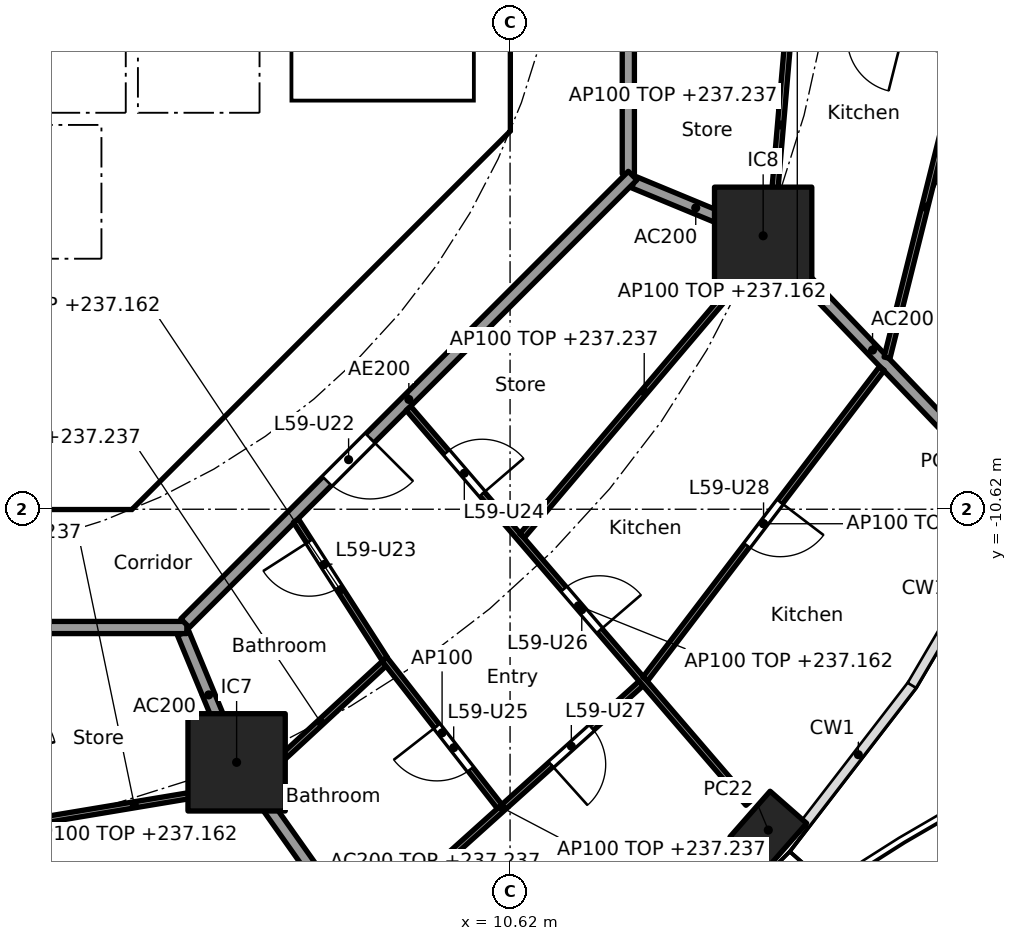
"""IFC4 building model, lengths in metres.
Left out: names, types, materials, properties, quantities, classifications, styles, units other than length and angle.
Written with IfcOpenShell. Run it as: python <this file> out.ifc"""

import sys

from ifc_helpers import new_model, si_unit, direction, frame, frame_2d, origin, origin_2d, place, context, subcontext, project, spatial, polyline, rectangle, hollow_rectangle, outline, extrude, element, fill, save


model = new_model("IFC4")
c1 = context("Model", 3, precision=1e-05, world=origin(), true_north=direction((0.0, 1.0)))
c2 = subcontext(c1, "Body", "Model", "MODEL_VIEW")
j1 = project(units=[si_unit("LENGTHUNIT", "METRE"), si_unit("PLANEANGLEUNIT", "RADIAN")], contexts=[c1])
p1 = place(None, origin())
s1 = spatial("IfcSite", under=j1, at=p1, CompositionType="ELEMENT")
p2 = place(p1, origin())
s2 = spatial("IfcBuilding", under=s1, at=p2, CompositionType="ELEMENT")
p3 = place(p2, frame((0.0, 0.0, 234.4)))
s3 = spatial("IfcBuildingStorey", under=s2, at=p3, CompositionType="ELEMENT", Elevation=234.4)
p4 = place(p3, frame((14.866, -15.896, 0.0), z_axis=(0.0, 0.0, 1.0), x_axis=(0.660114607735, 0.751164898445, 0.0)))
e1 = element("IfcColumn", 1, at=p4, inside=s3, PredefinedType="COLUMN", context=c2, shape_type="SweptSolid", body=[
    extrude(hollow_rectangle(XDim=1.0, YDim=0.8, WallThickness=0.032, at=origin_2d()), origin(), (0.0, 0.0, 1.0), 3.7),
])
for number, where, z_axis, x_axis in (
    (2, (6.123, -14.782, 0.0), (0.0, 0.0, 1.0), (1.0, 0.0, 0.0)),
    (3, (14.782, -6.123, 0.0), (0.0, 0.0, 1.0), (1.0, 0.0, 0.0)),
):
    element("IfcColumn", number, at=place(p3, frame(where, z_axis=z_axis, x_axis=x_axis)), inside=s3, PredefinedType="COLUMN", context=c2, shape_type="SweptSolid", body=[
        extrude(rectangle(XDim=1.6, YDim=1.6, at=origin_2d()), origin(), (0.0, 0.0, 1.0), 3.7),
    ])
p5 = place(p3, frame((4.613, -9.988, 0.0), z_axis=(0.0, 0.0, 1.0), x_axis=(0.707106781187, 0.707106781187, 0.0)))
e4 = element("IfcWall", 4, at=p5, inside=s3, PredefinedType="SHEAR", context=c2, shape_type="SweptSolid", body=[
    extrude(rectangle(XDim=7.602, YDim=0.6, at=frame_2d((3.801, 0.0))), origin(), (0.0, 0.0, 1.0), 3.44),
])
p6 = place(p5, frame((3.201, 0.0, 0.0)))
e5 = element("IfcOpeningElement", 5, at=p6, cuts=e4, PredefinedType="OPENING", context=c2, shape_type="SweptSolid", body=[
    extrude(rectangle(XDim=1.2, YDim=2.1, at=frame_2d((0.6, 1.05))), frame((0.0, 0.31, 0.0), z_axis=(0.0, -1.0, 0.0), x_axis=(1.0, 0.0, 0.0)), (0.0, 0.0, 1.0), 0.62),
])
p7 = place(p3, frame((4.0, -10.025, 0.0), z_axis=(0.0, 0.0, 1.0), x_axis=(0.0, 1.0, 0.0)))
e6 = element("IfcWall", 6, at=p7, inside=s3, PredefinedType="SOLIDWALL", context=c2, shape_type="SweptSolid", body=[
    extrude(rectangle(XDim=3.0, YDim=0.2, at=frame_2d((1.5, 0.0))), origin(), (0.0, 0.0, 1.0), 3.44),
])
p8 = place(p7, frame((0.975, 0.0, 0.0)))
e7 = element("IfcOpeningElement", 7, at=p8, cuts=e6, PredefinedType="OPENING", context=c2, shape_type="SweptSolid", body=[
    extrude(rectangle(XDim=1.1, YDim=2.1, at=frame_2d((0.55, 1.05))), frame((0.0, 0.11, 0.0), z_axis=(0.0, -1.0, 0.0), x_axis=(1.0, 0.0, 0.0)), (0.0, 0.0, 1.0), 0.22),
])
p9 = place(p3, frame((4.0, -6.5, 0.0), z_axis=(0.0, 0.0, 1.0), x_axis=(0.0, 1.0, 0.0)))
e8 = element("IfcWall", 8, at=p9, inside=s3, PredefinedType="SOLIDWALL", context=c2, shape_type="SweptSolid", body=[
    extrude(rectangle(XDim=2.2, YDim=0.2, at=frame_2d((1.1, 0.0))), origin(), (0.0, 0.0, 1.0), 3.44),
])
p10 = place(p9, frame((0.55, 0.0, 0.0)))
e9 = element("IfcOpeningElement", 9, at=p10, cuts=e8, PredefinedType="OPENING", context=c2, shape_type="SweptSolid", body=[
    extrude(rectangle(XDim=1.1, YDim=2.1, at=frame_2d((0.55, 1.05))), frame((0.0, 0.11, 0.0), z_axis=(0.0, -1.0, 0.0), x_axis=(1.0, 0.0, 0.0)), (0.0, 0.0, 1.0), 0.22),
])
p11 = place(p3, origin())
e10 = element("IfcWall", 10, at=p11, inside=s3, PredefinedType="SHEAR", context=c2, shape_type="SweptSolid", body=[
    extrude(outline(polyline([(-4.152, -10.025), (4.152, -10.025), (4.401, -9.776), (4.825, -10.2), (4.401, -10.625), (-4.401, -10.625), (-4.825, -10.2), (-4.401, -9.776), (-4.152, -10.025)])), origin(), (0.0, 0.0, 1.0), 3.44),
])
p12 = place(p3, origin())
e11 = element("IfcWall", 11, at=p12, inside=s3, PredefinedType="SHEAR", context=c2, shape_type="SweptSolid", body=[
    extrude(outline(polyline([(9.776, -4.401), (10.025, -4.152), (10.025, -3.801), (10.025, 4.152), (9.776, 4.401), (10.2, 4.825), (10.625, 4.401), (10.625, -4.401), (10.2, -4.825), (9.776, -4.401)])), origin(), (0.0, 0.0, 1.0), 3.44),
])
p13 = place(p3, origin())
e12 = element("IfcWall", 12, at=p13, inside=s3, PredefinedType="SOLIDWALL", context=c2, shape_type="SweptSolid", body=[
    extrude(outline(polyline([(-6.7, -2.1), (-6.5, -2.1), (-6.5, -4.1), (-4.5, -4.1), (-4.5, -2.1), (-4.3, -2.1), (-4.3, -4.1), (-2.3, -4.1), (-2.3, -2.1), (-2.1, -2.1), (-2.1, -4.1), (-0.1, -4.1), (-0.1, -2.1), (0.1, -2.1), (0.1, -4.1), (2.1, -4.1), (2.1, -2.1), (2.3, -2.1), (2.3, -4.1), (4.3, -4.1), (4.3, -2.1), (4.5, -2.1), (4.5, -4.1), (6.5, -4.1), (6.5, -2.1), (6.7, -2.1), (6.7, -4.3), (-6.7, -4.3), (-6.7, -2.1)])), origin(), (0.0, 0.0, 1.0), 3.44),
])
p14 = place(p3, origin())
e13 = element("IfcWall", 13, at=p14, inside=s3, PredefinedType="SOLIDWALL", context=c2, shape_type="SweptSolid", body=[
    extrude(outline(polyline([(4.1, -7.025), (-4.1, -7.025), (-4.1, -6.5), (4.1, -6.5), (4.1, -7.025)])), origin(), (0.0, 0.0, 1.0), 3.44),
])
p15 = place(p3, origin())
e14 = element("IfcWall", 14, at=p15, inside=s3, PredefinedType="SOLIDWALL", context=c2, shape_type="SweptSolid", body=[
    extrude(outline(polyline([(7.025, -3.9), (6.7, -3.9), (6.7, 3.9), (7.025, 3.9), (7.025, -3.9)])), origin(), (0.0, 0.0, 1.0), 3.44),
])
p16 = place(p3, origin())
e15 = element("IfcWall", 15, at=p16, inside=s3, PredefinedType="SOLIDWALL", context=c2, shape_type="SweptSolid", body=[
    extrude(outline(polyline([(10.025, -4.1), (6.7, -4.1), (6.7, -3.9), (10.025, -3.9), (10.025, -4.1)])), origin(), (0.0, 0.0, 1.0), 3.44),
])
p17 = place(p3, frame((5.243, -12.657, 0.0), z_axis=(0.0, 0.0, 1.0), x_axis=(0.382691608661, -0.923876145736, 0.0)))
e16 = element("IfcWall", 16, at=p17, inside=s3, PredefinedType="PARTITIONING", context=c2, shape_type="SweptSolid", body=[
    extrude(rectangle(XDim=2.2, YDim=0.2, at=frame_2d((1.1, 0.0))), origin(), (0.0, 0.0, 1.0), 3.44),
])
p18 = place(p3, frame((6.152, -14.823, 0.0), z_axis=(0.0, 0.0, 1.0), x_axis=(0.576994695158, -0.816747893637, 0.0)))
e17 = element("IfcWall", 17, at=p18, inside=s3, PredefinedType="PARTITIONING", context=c2, shape_type="SweptSolid", body=[
    extrude(rectangle(XDim=6.03, YDim=0.2, at=frame_2d((3.015, 0.0))), origin(), (0.0, 0.0, 1.0), 2.837),
])
p19 = place(p3, frame((12.657, -5.243, 0.0), z_axis=(0.0, 0.0, 1.0), x_axis=(0.923853160736, -0.382747093259, 0.0)))
e18 = element("IfcWall", 18, at=p19, inside=s3, PredefinedType="PARTITIONING", context=c2, shape_type="SweptSolid", body=[
    extrude(rectangle(XDim=2.2, YDim=0.2, at=frame_2d((1.1, 0.0))), origin(), (0.0, 0.0, 1.0), 3.44),
])
p20 = place(p3, frame((14.817, -6.159, 0.0), z_axis=(0.0, 0.0, 1.0), x_axis=(0.691437669875, -0.722436120828, 0.0)))
e19 = element("IfcWall", 19, at=p20, inside=s3, PredefinedType="PARTITIONING", context=c2, shape_type="SweptSolid", body=[
    extrude(rectangle(XDim=5.104, YDim=0.2, at=frame_2d((2.552, 0.0))), origin(), (0.0, 0.0, 1.0), 3.44),
])
p21 = place(p3, frame((12.565, -5.104, 0.0), z_axis=(0.0, 0.0, 1.0), x_axis=(0.0, 1.0, 0.0)))
e20 = element("IfcWall", 20, at=p21, inside=s3, PredefinedType="PARTITIONING", context=c2, shape_type="SweptSolid", body=[
    extrude(rectangle(XDim=10.209, YDim=0.2, at=frame_2d((5.104, 0.0))), origin(), (0.0, 0.0, 1.0), 3.44),
])
p22 = place(p21, frame((4.604, 0.0, 0.0)))
e21 = element("IfcOpeningElement", 21, at=p22, cuts=e20, PredefinedType="OPENING", context=c2, shape_type="SweptSolid", body=[
    extrude(rectangle(XDim=1.0, YDim=2.1, at=frame_2d((0.5, 1.05))), frame((0.0, 0.11, 0.0), z_axis=(0.0, -1.0, 0.0), x_axis=(1.0, 0.0, 0.0)), (0.0, 0.0, 1.0), 0.22),
])
p23 = place(p3, frame((-5.104, -12.565, 0.0), z_axis=(0.0, 0.0, 1.0), x_axis=(1.0, 0.0, 0.0)))
e22 = element("IfcWall", 22, at=p23, inside=s3, PredefinedType="PARTITIONING", context=c2, shape_type="SweptSolid", body=[
    extrude(rectangle(XDim=10.409, YDim=0.2, at=frame_2d((5.205, 0.0))), origin(), (0.0, 0.0, 1.0), 3.44),
])
p24 = place(p23, frame((4.604, 0.0, 0.0)))
e23 = element("IfcOpeningElement", 23, at=p24, cuts=e22, PredefinedType="OPENING", context=c2, shape_type="SweptSolid", body=[
    extrude(rectangle(XDim=1.0, YDim=2.1, at=frame_2d((0.5, 1.05))), frame((0.0, 0.11, 0.0), z_axis=(0.0, -1.0, 0.0), x_axis=(1.0, 0.0, 0.0)), (0.0, 0.0, 1.0), 0.22),
])
p25 = place(p3, frame((5.275, -12.494, 0.0), z_axis=(0.0, 0.0, 1.0), x_axis=(0.707106781187, 0.707106781187, 0.0)))
e24 = element("IfcWall", 24, at=p25, inside=s3, PredefinedType="PARTITIONING", context=c2, shape_type="SweptSolid", body=[
    extrude(rectangle(XDim=10.409, YDim=0.2, at=frame_2d((5.205, 0.0))), origin(), (0.0, 0.0, 1.0), 3.44),
])
p26 = place(p25, frame((3.303, 0.0, 0.0)))
e25 = element("IfcOpeningElement", 25, at=p26, cuts=e24, PredefinedType="OPENING", context=c2, shape_type="SweptSolid", body=[
    extrude(rectangle(XDim=1.0, YDim=2.1, at=frame_2d((0.5, 1.05))), frame((0.0, 0.11, 0.0), z_axis=(0.0, -1.0, 0.0), x_axis=(1.0, 0.0, 0.0)), (0.0, 0.0, 1.0), 0.22),
])
p27 = place(p3, frame((1.759, -12.662, 0.0), z_axis=(0.0, 0.0, 1.0), x_axis=(0.242653275363, -0.970113079984, 0.0)))
e26 = element("IfcWall", 26, at=p27, inside=s3, PredefinedType="PARTITIONING", context=c2, shape_type="SweptSolid", body=[
    extrude(rectangle(XDim=6.836, YDim=0.1, at=frame_2d((3.418, 0.0))), origin(), (0.0, 0.0, 1.0), 2.762),
])
p28 = place(p27, frame((1.166, 0.0, 0.0)))
e27 = element("IfcOpeningElement", 27, at=p28, cuts=e26, PredefinedType="OPENING", context=c2, shape_type="SweptSolid", body=[
    extrude(rectangle(XDim=0.9, YDim=2.1, at=frame_2d((0.45, 1.05))), frame((0.0, 0.06, 0.0), z_axis=(0.0, -1.0, 0.0), x_axis=(1.0, 0.0, 0.0)), (0.0, 0.0, 1.0), 0.12),
])
p29 = place(p27, frame((4.559, 0.0, 0.0)))
e28 = element("IfcOpeningElement", 28, at=p29, cuts=e26, PredefinedType="OPENING", context=c2, shape_type="SweptSolid", body=[
    extrude(rectangle(XDim=0.9, YDim=2.1, at=frame_2d((0.45, 1.05))), frame((0.0, 0.06, 0.0), z_axis=(0.0, -1.0, 0.0), x_axis=(1.0, 0.0, 0.0)), (0.0, 0.0, 1.0), 0.12),
])
p30 = place(p3, frame((2.593, -15.789, 0.0), z_axis=(0.0, 0.0, 1.0), x_axis=(0.986385117656, 0.164451815639, 0.0)))
e29 = element("IfcWall", 29, at=p30, inside=s3, PredefinedType="PARTITIONING", context=c2, shape_type="SweptSolid", body=[
    extrude(rectangle(XDim=3.747, YDim=0.1, at=frame_2d((1.874, 0.0))), origin(), (0.0, 0.0, 1.0), 2.837),
])
p31 = place(p3, frame((6.461, -15.088, 0.0), z_axis=(0.0, 0.0, 1.0), x_axis=(0.734625662691, 0.678472649203, 0.0)))
e30 = element("IfcWall", 30, at=p31, inside=s3, PredefinedType="PARTITIONING", context=c2, shape_type="SweptSolid", body=[
    extrude(rectangle(XDim=2.844, YDim=0.1, at=frame_2d((1.422, 0.0))), origin(), (0.0, 0.0, 1.0), 2.837),
])
p32 = place(p3, frame((8.22, -17.579, 0.0), z_axis=(0.0, 0.0, 1.0), x_axis=(0.743696370895, 0.668517544958, 0.0)))
e31 = element("IfcWall", 31, at=p32, inside=s3, PredefinedType="PARTITIONING", context=c2, shape_type="SweptSolid", body=[
    extrude(rectangle(XDim=6.125, YDim=0.1, at=frame_2d((3.062, 0.0))), origin(), (0.0, 0.0, 1.0), 2.837),
])
p33 = place(p32, frame((4.131, 0.0, 0.0)))
e32 = element("IfcOpeningElement", 32, at=p33, cuts=e31, PredefinedType="OPENING", context=c2, shape_type="SweptSolid", body=[
    extrude(rectangle(XDim=0.9, YDim=2.1, at=frame_2d((0.45, 1.05))), frame((0.0, 0.06, 0.0), z_axis=(0.0, -1.0, 0.0), x_axis=(1.0, 0.0, 0.0)), (0.0, 0.0, 1.0), 0.12),
])
p34 = place(p3, frame((7.099, -10.809, 0.0), z_axis=(0.0, 0.0, 1.0), x_axis=(0.540424285965, -0.841392649801, 0.0)))
e33 = element("IfcWall", 33, at=p34, inside=s3, PredefinedType="PARTITIONING", context=c2, shape_type="SweptSolid", body=[
    extrude(rectangle(XDim=2.703, YDim=0.1, at=frame_2d((1.352, 0.0))), origin(), (0.0, 0.0, 1.0), 2.762),
])
p35 = place(p34, frame((0.405, 0.0, 0.0)))
e34 = element("IfcOpeningElement", 34, at=p35, cuts=e33, PredefinedType="OPENING", context=c2, shape_type="SweptSolid", body=[
    extrude(rectangle(XDim=0.9, YDim=2.1, at=frame_2d((0.45, 1.05))), frame((0.0, 0.06, 0.0), z_axis=(0.0, -1.0, 0.0), x_axis=(1.0, 0.0, 0.0)), (0.0, 0.0, 1.0), 0.12),
])
p36 = place(p3, frame((8.555, -13.086, 0.0), z_axis=(0.0, 0.0, 1.0), x_axis=(0.61562093425, -0.788042426087, 0.0)))
e35 = element("IfcWall", 35, at=p36, inside=s3, PredefinedType="PARTITIONING", context=c2, shape_type="SweptSolid", body=[
    extrude(rectangle(XDim=3.075, YDim=0.1, at=frame_2d((1.538, 0.0))), origin(), (0.0, 0.0, 1.0), 3.44),
])
p37 = place(p36, frame((1.398, 0.0, 0.0)))
e36 = element("IfcOpeningElement", 36, at=p37, cuts=e35, PredefinedType="OPENING", context=c2, shape_type="SweptSolid", body=[
    extrude(rectangle(XDim=0.9, YDim=2.1, at=frame_2d((0.45, 1.05))), frame((0.0, 0.06, 0.0), z_axis=(0.0, -1.0, 0.0), x_axis=(1.0, 0.0, 0.0)), (0.0, 0.0, 1.0), 0.12),
])
p38 = place(p3, frame((8.95, -8.96, 0.0), z_axis=(0.0, 0.0, 1.0), x_axis=(0.652102165991, -0.758131100213, 0.0)))
e37 = element("IfcWall", 37, at=p38, inside=s3, PredefinedType="PARTITIONING", context=c2, shape_type="SweptSolid", body=[
    extrude(rectangle(XDim=8.568, YDim=0.1, at=frame_2d((4.284, 0.0))), origin(), (0.0, 0.0, 1.0), 2.762),
])
p39 = place(p38, frame((0.957, 0.0, 0.0)))
e38 = element("IfcOpeningElement", 38, at=p39, cuts=e37, PredefinedType="OPENING", context=c2, shape_type="SweptSolid", body=[
    extrude(rectangle(XDim=0.9, YDim=2.1, at=frame_2d((0.45, 1.05))), frame((0.0, 0.06, 0.0), z_axis=(0.0, -1.0, 0.0), x_axis=(1.0, 0.0, 0.0)), (0.0, 0.0, 1.0), 0.12),
])
p40 = place(p38, frame((3.919, 0.0, 0.0)))
e39 = element("IfcOpeningElement", 39, at=p40, cuts=e37, PredefinedType="OPENING", context=c2, shape_type="SweptSolid", body=[
    extrude(rectangle(XDim=0.9, YDim=2.1, at=frame_2d((0.45, 1.05))), frame((0.0, 0.06, 0.0), z_axis=(0.0, -1.0, 0.0), x_axis=(1.0, 0.0, 0.0)), (0.0, 0.0, 1.0), 0.12),
])
p41 = place(p3, frame((10.818, -11.056, 0.0), z_axis=(0.0, 0.0, 1.0), x_axis=(0.646981604878, 0.762505608471, 0.0)))
e40 = element("IfcWall", 40, at=p41, inside=s3, PredefinedType="PARTITIONING", context=c2, shape_type="SweptSolid", body=[
    extrude(rectangle(XDim=6.209, YDim=0.1, at=frame_2d((3.104, 0.0))), origin(), (0.0, 0.0, 1.0), 2.837),
])
p42 = place(p3, frame((12.843, -13.411, 0.0), z_axis=(0.0, 0.0, 1.0), x_axis=(0.606128002625, 0.795367112995, 0.0)))
e41 = element("IfcWall", 41, at=p42, inside=s3, PredefinedType="PARTITIONING", context=c2, shape_type="SweptSolid", body=[
    extrude(rectangle(XDim=6.42, YDim=0.1, at=frame_2d((3.21, 0.0))), origin(), (0.0, 0.0, 1.0), 2.837),
])
p43 = place(p42, frame((2.76, 0.0, 0.0)))
e42 = element("IfcOpeningElement", 42, at=p43, cuts=e41, PredefinedType="OPENING", context=c2, shape_type="SweptSolid", body=[
    extrude(rectangle(XDim=0.9, YDim=2.1, at=frame_2d((0.45, 1.05))), frame((0.0, 0.06, 0.0), z_axis=(0.0, -1.0, 0.0), x_axis=(1.0, 0.0, 0.0)), (0.0, 0.0, 1.0), 0.12),
])
p44 = place(p3, frame((14.908, -6.146, 0.0), z_axis=(0.0, 0.0, 1.0), x_axis=(0.085881574106, 0.996305352404, 0.0)))
e43 = element("IfcWall", 43, at=p44, inside=s3, PredefinedType="PARTITIONING", context=c2, shape_type="SweptSolid", body=[
    extrude(rectangle(XDim=3.704, YDim=0.1, at=frame_2d((1.852, 0.0))), origin(), (0.0, 0.0, 1.0), 2.837),
])
p45 = place(p3, frame((16.819, -8.129, 0.0), z_axis=(0.0, 0.0, 1.0), x_axis=(0.243041266705, 0.970015949703, 0.0)))
e44 = element("IfcWall", 44, at=p45, inside=s3, PredefinedType="PARTITIONING", context=c2, shape_type="SweptSolid", body=[
    extrude(rectangle(XDim=5.112, YDim=0.1, at=frame_2d((2.556, 0.0))), origin(), (0.0, 0.0, 1.0), 2.837),
])
p46 = place(p3, frame((12.662, -1.759, 0.0), z_axis=(0.0, 0.0, 1.0), x_axis=(0.969746519828, -0.24411408661, 0.0)))
e45 = element("IfcWall", 45, at=p46, inside=s3, PredefinedType="PARTITIONING", context=c2, shape_type="SweptSolid", body=[
    extrude(rectangle(XDim=5.531, YDim=0.1, at=frame_2d((2.765, 0.0))), origin(), (0.0, 0.0, 1.0), 2.762),
])
p47 = place(p46, frame((0.874, 0.0, 0.0)))
e46 = element("IfcOpeningElement", 46, at=p47, cuts=e45, PredefinedType="OPENING", context=c2, shape_type="SweptSolid", body=[
    extrude(rectangle(XDim=0.9, YDim=2.1, at=frame_2d((0.45, 1.05))), frame((0.0, 0.06, 0.0), z_axis=(0.0, -1.0, 0.0), x_axis=(1.0, 0.0, 0.0)), (0.0, 0.0, 1.0), 0.12),
])
p48 = place(p46, frame((3.64, 0.0, 0.0)))
e47 = element("IfcOpeningElement", 47, at=p48, cuts=e45, PredefinedType="OPENING", context=c2, shape_type="SweptSolid", body=[
    extrude(rectangle(XDim=0.9, YDim=2.1, at=frame_2d((0.45, 1.05))), frame((0.0, 0.06, 0.0), z_axis=(0.0, -1.0, 0.0), x_axis=(1.0, 0.0, 0.0)), (0.0, 0.0, 1.0), 0.12),
])
p49 = place(p10, origin())
e48 = element("IfcDoor", 48, at=p49, inside=s3, OperationType="DOUBLE_DOOR_SLIDING", PredefinedType="DOOR", context=c2, shape_type="SweptSolid", body=[
    extrude(rectangle(XDim=1.1, YDim=2.1, at=frame_2d((0.55, 1.05))), frame((0.0, 0.025, 0.0), z_axis=(0.0, -1.0, 0.0), x_axis=(1.0, 0.0, 0.0)), (0.0, 0.0, 1.0), 0.05),
])
fill(e9, e48)
p50 = place(p8, origin())
e49 = element("IfcDoor", 49, at=p50, inside=s3, OperationType="SINGLE_SWING_LEFT", PredefinedType="DOOR", context=c2, shape_type="SweptSolid", body=[
    extrude(rectangle(XDim=1.1, YDim=2.1, at=frame_2d((0.55, 1.05))), frame((0.0, 0.025, 0.0), z_axis=(0.0, -1.0, 0.0), x_axis=(1.0, 0.0, 0.0)), (0.0, 0.0, 1.0), 0.05),
])
fill(e7, e49)
p51 = place(p6, origin())
e50 = element("IfcDoor", 50, at=p51, inside=s3, OperationType="SINGLE_SWING_LEFT", PredefinedType="DOOR", context=c2, shape_type="SweptSolid", body=[
    extrude(rectangle(XDim=1.2, YDim=2.1, at=frame_2d((0.6, 1.05))), frame((0.0, 0.025, 0.0), z_axis=(0.0, -1.0, 0.0), x_axis=(1.0, 0.0, 0.0)), (0.0, 0.0, 1.0), 0.05),
])
fill(e5, e50)
p52 = place(p26, frame((1.0, 0.0, 0.0), x_axis=(-1.0, 0.0, 0.0)))
e51 = element("IfcDoor", 51, at=p52, inside=s3, OperationType="SINGLE_SWING_LEFT", PredefinedType="DOOR", context=c2, shape_type="SweptSolid", body=[
    extrude(rectangle(XDim=1.0, YDim=2.1, at=frame_2d((0.5, 1.05))), frame((0.0, 0.025, 0.0), z_axis=(0.0, -1.0, 0.0), x_axis=(1.0, 0.0, 0.0)), (0.0, 0.0, 1.0), 0.05),
])
fill(e25, e51)
p53 = place(p35, frame((0.9, 0.0, 0.0), x_axis=(-1.0, 0.0, 0.0)))
e52 = element("IfcDoor", 52, at=p53, inside=s3, OperationType="SINGLE_SWING_RIGHT", PredefinedType="DOOR", context=c2, shape_type="SweptSolid", body=[
    extrude(rectangle(XDim=0.9, YDim=2.1, at=frame_2d((0.45, 1.05))), frame((0.0, 0.025, 0.0), z_axis=(0.0, -1.0, 0.0), x_axis=(1.0, 0.0, 0.0)), (0.0, 0.0, 1.0), 0.05),
])
fill(e34, e52)
p54 = place(p39, origin())
e53 = element("IfcDoor", 53, at=p54, inside=s3, OperationType="SINGLE_SWING_RIGHT", PredefinedType="DOOR", context=c2, shape_type="SweptSolid", body=[
    extrude(rectangle(XDim=0.9, YDim=2.1, at=frame_2d((0.45, 1.05))), frame((0.0, 0.025, 0.0), z_axis=(0.0, -1.0, 0.0), x_axis=(1.0, 0.0, 0.0)), (0.0, 0.0, 1.0), 0.05),
])
fill(e38, e53)
p55 = place(p37, frame((0.9, 0.0, 0.0), x_axis=(-1.0, 0.0, 0.0)))
e54 = element("IfcDoor", 54, at=p55, inside=s3, OperationType="SINGLE_SWING_RIGHT", PredefinedType="DOOR", context=c2, shape_type="SweptSolid", body=[
    extrude(rectangle(XDim=0.9, YDim=2.1, at=frame_2d((0.45, 1.05))), frame((0.0, 0.025, 0.0), z_axis=(0.0, -1.0, 0.0), x_axis=(1.0, 0.0, 0.0)), (0.0, 0.0, 1.0), 0.05),
])
fill(e36, e54)
p56 = place(p40, origin())
e55 = element("IfcDoor", 55, at=p56, inside=s3, OperationType="SINGLE_SWING_RIGHT", PredefinedType="DOOR", context=c2, shape_type="SweptSolid", body=[
    extrude(rectangle(XDim=0.9, YDim=2.1, at=frame_2d((0.45, 1.05))), frame((0.0, 0.025, 0.0), z_axis=(0.0, -1.0, 0.0), x_axis=(1.0, 0.0, 0.0)), (0.0, 0.0, 1.0), 0.05),
])
fill(e39, e55)
p57 = place(p33, frame((0.9, 0.0, 0.0), x_axis=(-1.0, 0.0, 0.0)))
e56 = element("IfcDoor", 56, at=p57, inside=s3, OperationType="SINGLE_SWING_RIGHT", PredefinedType="DOOR", context=c2, shape_type="SweptSolid", body=[
    extrude(rectangle(XDim=0.9, YDim=2.1, at=frame_2d((0.45, 1.05))), frame((0.0, 0.025, 0.0), z_axis=(0.0, -1.0, 0.0), x_axis=(1.0, 0.0, 0.0)), (0.0, 0.0, 1.0), 0.05),
])
fill(e32, e56)
p58 = place(p43, frame((0.9, 0.0, 0.0), x_axis=(-1.0, 0.0, 0.0)))
e57 = element("IfcDoor", 57, at=p58, inside=s3, OperationType="SINGLE_SWING_LEFT", PredefinedType="DOOR", context=c2, shape_type="SweptSolid", body=[
    extrude(rectangle(XDim=0.9, YDim=2.1, at=frame_2d((0.45, 1.05))), frame((0.0, 0.025, 0.0), z_axis=(0.0, -1.0, 0.0), x_axis=(1.0, 0.0, 0.0)), (0.0, 0.0, 1.0), 0.05),
])
fill(e42, e57)
save(model, sys.argv[1])
